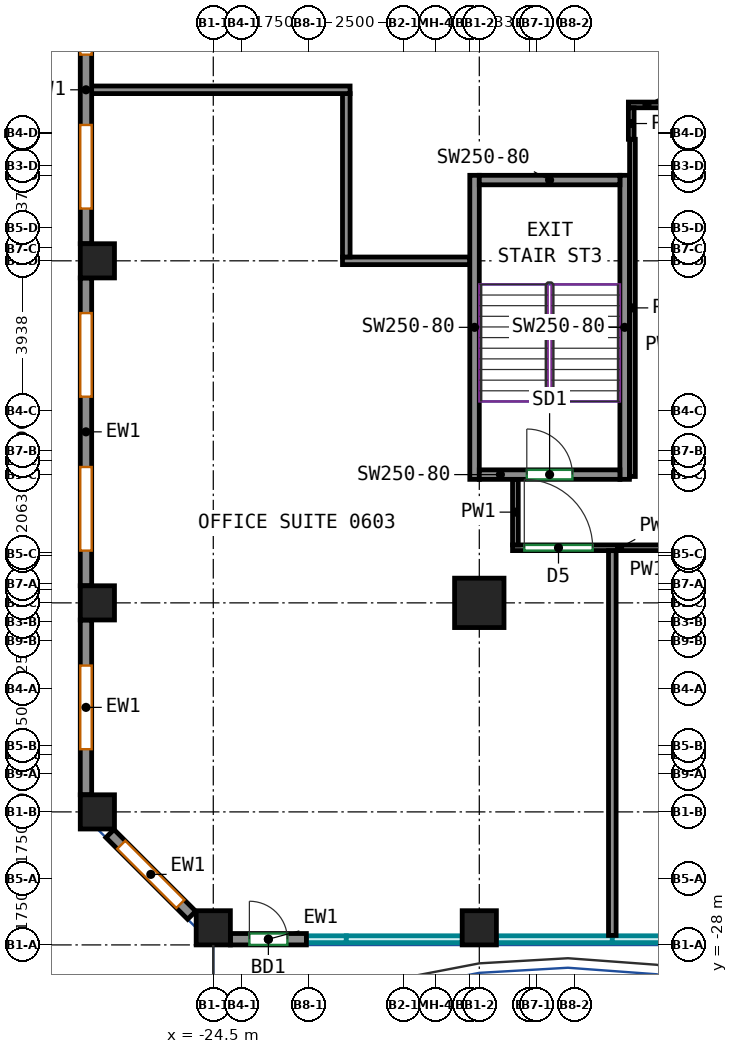
"""IFC4 building model, lengths in metres.
Left out: names, types, materials, properties, quantities, classifications, styles, units other than length and angle.
Written with IfcOpenShell. Run it as: python <this file> out.ifc"""

import sys

from ifc_helpers import new_model, si_unit, direction, frame, frame_2d, origin, origin_2d, place, context, subcontext, project, spatial, rectangle, extrude, source, transform, mapped, element, fill, save


model = new_model("IFC4")
c1 = context("Model", 3, precision=1e-05, world=origin(), true_north=direction((0.0, 1.0)))
c2 = subcontext(c1, "Body", "Model", "MODEL_VIEW")
j1 = project(units=[si_unit("LENGTHUNIT", "METRE"), si_unit("PLANEANGLEUNIT", "RADIAN")], contexts=[c1])
p1 = place(None, origin())
s1 = spatial("IfcSite", under=j1, at=p1, CompositionType="ELEMENT")
p2 = place(p1, origin())
s2 = spatial("IfcBuilding", under=s1, at=p2, CompositionType="ELEMENT")
p3 = place(p2, frame((0.0, 0.0, 31.0)))
s3 = spatial("IfcBuildingStorey", under=s2, at=p3, CompositionType="ELEMENT", Elevation=31.0)
m1 = source(origin(), c2, "Body", "SweptSolid", [
    extrude(rectangle(XDim=0.9, YDim=0.9, at=origin_2d()), origin(), (0.0, 0.0, 1.0), 3.72),
])
for number, where, z_axis, x_axis in (
    (1, (-27.55, -24.5, 0.0), (0.0, 0.0, 1.0), (1.0, 0.0, 0.0)),
    (2, (-27.55, -19.0, 0.0), (0.0, 0.0, 1.0), (1.0, 0.0, 0.0)),
    (3, (-27.55, -10.0, 0.0), (0.0, 0.0, 1.0), (1.0, 0.0, 0.0)),
    (4, (-24.5, -27.55, 0.0), (0.0, 0.0, 1.0), (1.0, 0.0, 0.0)),
    (5, (-17.5, -27.55, 0.0), (0.0, 0.0, 1.0), (1.0, 0.0, 0.0)),
):
    element("IfcColumn", number, at=place(p3, frame(where, z_axis=z_axis, x_axis=x_axis)), inside=s3, PredefinedType="COLUMN", context=c2, shape_type="MappedRepresentation", body=[
        mapped(m1, transform((0.0, 0.0, 0.0))),
    ])
m2 = source(origin(), c2, "Body", "SweptSolid", [
    extrude(rectangle(XDim=1.3, YDim=1.3, at=origin_2d()), origin(), (0.0, 0.0, 1.0), 3.72),
])
p4 = place(p3, frame((-17.5, -19.0, 0.0), z_axis=(0.0, 0.0, 1.0), x_axis=(1.0, 0.0, 0.0)))
e6 = element("IfcColumn", 6, at=p4, inside=s3, PredefinedType="COLUMN", context=c2, shape_type="MappedRepresentation", body=[
    mapped(m2, transform((0.0, 0.0, 0.0))),
])
m3 = source(origin(), c2, "Body", "SweptSolid", [
    extrude(rectangle(XDim=8.0, YDim=0.25, at=frame_2d((4.0, 0.0))), origin(), (0.0, 0.0, 1.0), 3.72),
])
for number, where, z_axis, x_axis in (
    (7, (-17.625, -15.75, 0.0), (0.0, 0.0, 1.0), (0.0, 1.0, 0.0)),
    (8, (-13.675, -15.75, 0.0), (0.0, 0.0, 1.0), (0.0, 1.0, 0.0)),
):
    element("IfcWall", number, at=place(p3, frame(where, z_axis=z_axis, x_axis=x_axis)), inside=s3, PredefinedType="SHEAR", context=c2, shape_type="MappedRepresentation", body=[
        mapped(m3, transform((0.0, 0.0, 0.0))),
    ])
m4 = source(origin(), c2, "Body", "SweptSolid", [
    extrude(rectangle(XDim=3.7, YDim=0.25, at=frame_2d((1.85, 0.0))), origin(), (0.0, 0.0, 1.0), 3.72),
])
p5 = place(p3, frame((-17.5, -15.625, 0.0), z_axis=(0.0, 0.0, 1.0), x_axis=(1.0, 0.0, 0.0)))
e9 = element("IfcWall", 9, at=p5, inside=s3, PredefinedType="SHEAR", context=c2, shape_type="MappedRepresentation", body=[
    mapped(m4, transform((0.0, 0.0, 0.0))),
])
p6 = place(p5, frame((1.25, 0.0, 0.0)))
e10 = element("IfcOpeningElement", 10, at=p6, cuts=e9, PredefinedType="OPENING", context=c2, shape_type="SweptSolid", body=[
    extrude(rectangle(XDim=1.2, YDim=2.1, at=frame_2d((0.6, 1.05))), frame((0.0, 0.135, 0.0), z_axis=(0.0, -1.0, 0.0), x_axis=(1.0, 0.0, 0.0)), (0.0, 0.0, 1.0), 0.27),
])
p7 = place(p3, frame((-17.5, -7.875, 0.0), z_axis=(0.0, 0.0, 1.0), x_axis=(1.0, 0.0, 0.0)))
e11 = element("IfcWall", 11, at=p7, inside=s3, PredefinedType="SHEAR", context=c2, shape_type="MappedRepresentation", body=[
    mapped(m4, transform((0.0, 0.0, 0.0))),
])
m5 = source(origin(), c2, "Body", "SweptSolid", [
    extrude(rectangle(XDim=2.0, YDim=0.3, at=frame_2d((1.0, 0.0))), origin(), (0.0, 0.0, 1.0), 3.72),
])
p8 = place(p3, frame((-24.05, -27.85, 0.0), z_axis=(0.0, 0.0, 1.0), x_axis=(1.0, 0.0, 0.0)))
e12 = element("IfcWall", 12, at=p8, inside=s3, PredefinedType="SOLIDWALL", context=c2, shape_type="MappedRepresentation", body=[
    mapped(m5, transform((0.0, 0.0, 0.0))),
])
p9 = place(p8, frame((0.5, 0.0, 0.0)))
e13 = element("IfcOpeningElement", 13, at=p9, cuts=e12, PredefinedType="OPENING", context=c2, shape_type="SweptSolid", body=[
    extrude(rectangle(XDim=1.0, YDim=2.1, at=frame_2d((0.5, 1.05))), frame((0.0, 0.16, 0.0), z_axis=(0.0, -1.0, 0.0), x_axis=(1.0, 0.0, 0.0)), (0.0, 0.0, 1.0), 0.32),
])
m6 = source(origin(), c2, "Body", "SweptSolid", [
    extrude(rectangle(XDim=8.1, YDim=0.3, at=frame_2d((4.05, 0.0))), origin(), (0.0, 0.0, 1.0), 3.72),
])
p10 = place(p3, frame((-27.85, -1.45, 0.0), z_axis=(0.0, 0.0, 1.0), x_axis=(0.0, -1.0, 0.0)))
e14 = element("IfcWall", 14, at=p10, inside=s3, PredefinedType="SOLIDWALL", context=c2, shape_type="MappedRepresentation", body=[
    mapped(m6, transform((0.0, 0.0, 0.0))),
])
p11 = place(p10, frame((0.925, 0.0, 0.7)))
e15 = element("IfcOpeningElement", 15, at=p11, cuts=e14, PredefinedType="OPENING", context=c2, shape_type="SweptSolid", body=[
    extrude(rectangle(XDim=2.2, YDim=2.25, at=frame_2d((1.1, 1.125))), frame((0.0, 0.16, 0.0), z_axis=(0.0, -1.0, 0.0), x_axis=(1.0, 0.0, 0.0)), (0.0, 0.0, 1.0), 0.32),
])
p12 = place(p10, frame((4.975, 0.0, 0.7)))
e16 = element("IfcOpeningElement", 16, at=p12, cuts=e14, PredefinedType="OPENING", context=c2, shape_type="SweptSolid", body=[
    extrude(rectangle(XDim=2.2, YDim=2.25, at=frame_2d((1.1, 1.125))), frame((0.0, 0.16, 0.0), z_axis=(0.0, -1.0, 0.0), x_axis=(1.0, 0.0, 0.0)), (0.0, 0.0, 1.0), 0.32),
])
p13 = place(p3, frame((-27.85, -10.45, 0.0), z_axis=(0.0, 0.0, 1.0), x_axis=(0.0, -1.0, 0.0)))
e17 = element("IfcWall", 17, at=p13, inside=s3, PredefinedType="SOLIDWALL", context=c2, shape_type="MappedRepresentation", body=[
    mapped(m6, transform((0.0, 0.0, 0.0))),
])
p14 = place(p13, frame((0.925, 0.0, 0.7)))
e18 = element("IfcOpeningElement", 18, at=p14, cuts=e17, PredefinedType="OPENING", context=c2, shape_type="SweptSolid", body=[
    extrude(rectangle(XDim=2.2, YDim=2.25, at=frame_2d((1.1, 1.125))), frame((0.0, 0.16, 0.0), z_axis=(0.0, -1.0, 0.0), x_axis=(1.0, 0.0, 0.0)), (0.0, 0.0, 1.0), 0.32),
])
p15 = place(p13, frame((4.975, 0.0, 0.7)))
e19 = element("IfcOpeningElement", 19, at=p15, cuts=e17, PredefinedType="OPENING", context=c2, shape_type="SweptSolid", body=[
    extrude(rectangle(XDim=2.2, YDim=2.25, at=frame_2d((1.1, 1.125))), frame((0.0, 0.16, 0.0), z_axis=(0.0, -1.0, 0.0), x_axis=(1.0, 0.0, 0.0)), (0.0, 0.0, 1.0), 0.32),
])
m7 = source(origin(), c2, "Body", "SweptSolid", [
    extrude(rectangle(XDim=4.6, YDim=0.3, at=frame_2d((2.3, 0.0))), origin(), (0.0, 0.0, 1.0), 3.72),
])
p16 = place(p3, frame((-27.85, -19.45, 0.0), z_axis=(0.0, 0.0, 1.0), x_axis=(0.0, -1.0, 0.0)))
e20 = element("IfcWall", 20, at=p16, inside=s3, PredefinedType="SOLIDWALL", context=c2, shape_type="MappedRepresentation", body=[
    mapped(m7, transform((0.0, 0.0, 0.0))),
])
p17 = place(p16, frame((1.2, 0.0, 0.7)))
e21 = element("IfcOpeningElement", 21, at=p17, cuts=e20, PredefinedType="OPENING", context=c2, shape_type="SweptSolid", body=[
    extrude(rectangle(XDim=2.2, YDim=2.25, at=frame_2d((1.1, 1.125))), frame((0.0, 0.16, 0.0), z_axis=(0.0, -1.0, 0.0), x_axis=(1.0, 0.0, 0.0)), (0.0, 0.0, 1.0), 0.32),
])
m8 = source(origin(), c2, "Body", "SweptSolid", [
    extrude(rectangle(XDim=3.041, YDim=0.3, at=frame_2d((1.521, 0.0))), origin(), (0.0, 0.0, 1.0), 3.72),
])
p18 = place(p3, frame((-27.219, -25.069, 0.0), z_axis=(0.0, 0.0, 1.0), x_axis=(0.707106781187, -0.707106781187, 0.0)))
e22 = element("IfcWall", 22, at=p18, inside=s3, PredefinedType="SOLIDWALL", context=c2, shape_type="MappedRepresentation", body=[
    mapped(m8, transform((0.0, 0.0, 0.0))),
])
p19 = place(p18, frame((0.42, 0.0, 0.7)))
e23 = element("IfcOpeningElement", 23, at=p19, cuts=e22, PredefinedType="OPENING", context=c2, shape_type="SweptSolid", body=[
    extrude(rectangle(XDim=2.2, YDim=2.25, at=frame_2d((1.1, 1.125))), frame((0.0, 0.16, 0.0), z_axis=(0.0, -1.0, 0.0), x_axis=(1.0, 0.0, 0.0)), (0.0, 0.0, 1.0), 0.32),
])
p20 = place(p3, frame((-12.598, -5.898, 0.0), z_axis=(0.0, 0.0, 1.0), x_axis=(-1.0, 0.0, 0.0)))
e24 = element("IfcWall", 24, at=p20, inside=s3, PredefinedType="PARTITIONING", context=c2, shape_type="SweptSolid", body=[
    extrude(rectangle(XDim=0.979, YDim=0.15, at=frame_2d((0.49, 0.0))), origin(), (0.0, 0.0, 1.0), 3.72),
])
p21 = place(p3, frame((-13.47, -6.802, 0.0), z_axis=(0.0, 0.0, 1.0), x_axis=(0.0, -1.0, 0.0)))
e25 = element("IfcWall", 25, at=p21, inside=s3, PredefinedType="PARTITIONING", context=c2, shape_type="SweptSolid", body=[
    extrude(rectangle(XDim=8.873, YDim=0.15, at=frame_2d((4.437, 0.0))), origin(), (0.0, 0.0, 1.0), 3.72),
])
p22 = place(p3, frame((-13.502, -5.973, 0.0), z_axis=(0.0, 0.0, 1.0), x_axis=(0.0, -1.0, 0.0)))
e26 = element("IfcWall", 26, at=p22, inside=s3, PredefinedType="PARTITIONING", context=c2, shape_type="SweptSolid", body=[
    extrude(rectangle(XDim=0.829, YDim=0.15, at=frame_2d((0.415, 0.0))), origin(), (0.0, 0.0, 1.0), 3.72),
])
p23 = place(p3, frame((-16.625, -17.55, 0.0), z_axis=(0.0, 0.0, 1.0), x_axis=(1.0, 0.0, 0.0)))
e27 = element("IfcWall", 27, at=p23, inside=s3, PredefinedType="PARTITIONING", context=c2, shape_type="SweptSolid", body=[
    extrude(rectangle(XDim=4.023, YDim=0.15, at=frame_2d((2.011, 0.0))), origin(), (0.0, 0.0, 1.0), 3.72),
])
p24 = place(p23, frame((0.309, 0.0, 0.0)))
e28 = element("IfcOpeningElement", 28, at=p24, cuts=e27, PredefinedType="OPENING", context=c2, shape_type="SweptSolid", body=[
    extrude(rectangle(XDim=1.8, YDim=2.1, at=frame_2d((0.9, 1.05))), frame((0.0, 0.085, 0.0), z_axis=(0.0, -1.0, 0.0), x_axis=(1.0, 0.0, 0.0)), (0.0, 0.0, 1.0), 0.17),
])
p25 = place(p3, frame((-16.55, -15.75, 0.0), z_axis=(0.0, 0.0, 1.0), x_axis=(0.0, -1.0, 0.0)))
e29 = element("IfcWall", 29, at=p25, inside=s3, PredefinedType="PARTITIONING", context=c2, shape_type="SweptSolid", body=[
    extrude(rectangle(XDim=1.725, YDim=0.15, at=frame_2d((0.863, 0.0))), origin(), (0.0, 0.0, 1.0), 3.72),
])
p26 = place(p3, frame((-21.1, -10.0, 0.0), z_axis=(0.0, 0.0, 1.0), x_axis=(1.0, 0.0, 0.0)))
e30 = element("IfcWall", 30, at=p26, inside=s3, PredefinedType="PARTITIONING", context=c2, shape_type="SweptSolid", body=[
    extrude(rectangle(XDim=3.35, YDim=0.2, at=frame_2d((1.675, 0.0))), origin(), (0.0, 0.0, 1.0), 3.72),
])
p27 = place(p3, frame((-21.0, -9.9, 0.0), z_axis=(0.0, 0.0, 1.0), x_axis=(0.0, 1.0, 0.0)))
e31 = element("IfcWall", 31, at=p27, inside=s3, PredefinedType="PARTITIONING", context=c2, shape_type="SweptSolid", body=[
    extrude(rectangle(XDim=4.3, YDim=0.2, at=frame_2d((2.15, 0.0))), origin(), (0.0, 0.0, 1.0), 3.72),
])
p28 = place(p3, frame((-27.75, -5.5, 0.0), z_axis=(0.0, 0.0, 1.0), x_axis=(1.0, 0.0, 0.0)))
e32 = element("IfcWall", 32, at=p28, inside=s3, PredefinedType="PARTITIONING", context=c2, shape_type="SweptSolid", body=[
    extrude(rectangle(XDim=6.85, YDim=0.2, at=frame_2d((3.425, 0.0))), origin(), (0.0, 0.0, 1.0), 3.72),
])
p29 = place(p3, frame((-14.0, -27.75, 0.0), z_axis=(0.0, 0.0, 1.0), x_axis=(0.0, 1.0, 0.0)))
e33 = element("IfcWall", 33, at=p29, inside=s3, PredefinedType="PARTITIONING", context=c2, shape_type="SweptSolid", body=[
    extrude(rectangle(XDim=10.124, YDim=0.2, at=frame_2d((5.062, 0.0))), origin(), (0.0, 0.0, 1.0), 3.72),
])
p30 = place(p9, origin())
e34 = element("IfcDoor", 34, at=p30, inside=s3, OperationType="SINGLE_SWING_LEFT", PredefinedType="DOOR", context=c2, shape_type="SweptSolid", body=[
    extrude(rectangle(XDim=1.0, YDim=2.1, at=frame_2d((0.5, 1.05))), frame((0.0, 0.025, 0.0), z_axis=(0.0, -1.0, 0.0), x_axis=(1.0, 0.0, 0.0)), (0.0, 0.0, 1.0), 0.05),
])
fill(e13, e34)
p31 = place(p11, origin())
e35 = element("IfcWindow", 35, at=p31, inside=s3, PartitioningType="SINGLE_PANEL", PredefinedType="WINDOW", context=c2, shape_type="SweptSolid", body=[
    extrude(rectangle(XDim=2.2, YDim=2.25, at=frame_2d((1.1, 1.125))), frame((0.0, 0.03, 0.0), z_axis=(0.0, -1.0, 0.0), x_axis=(1.0, 0.0, 0.0)), (0.0, 0.0, 1.0), 0.06),
])
fill(e15, e35)
p32 = place(p12, origin())
e36 = element("IfcWindow", 36, at=p32, inside=s3, PartitioningType="SINGLE_PANEL", PredefinedType="WINDOW", context=c2, shape_type="SweptSolid", body=[
    extrude(rectangle(XDim=2.2, YDim=2.25, at=frame_2d((1.1, 1.125))), frame((0.0, 0.03, 0.0), z_axis=(0.0, -1.0, 0.0), x_axis=(1.0, 0.0, 0.0)), (0.0, 0.0, 1.0), 0.06),
])
fill(e16, e36)
p33 = place(p14, origin())
e37 = element("IfcWindow", 37, at=p33, inside=s3, PartitioningType="SINGLE_PANEL", PredefinedType="WINDOW", context=c2, shape_type="SweptSolid", body=[
    extrude(rectangle(XDim=2.2, YDim=2.25, at=frame_2d((1.1, 1.125))), frame((0.0, 0.03, 0.0), z_axis=(0.0, -1.0, 0.0), x_axis=(1.0, 0.0, 0.0)), (0.0, 0.0, 1.0), 0.06),
])
fill(e18, e37)
p34 = place(p15, origin())
e38 = element("IfcWindow", 38, at=p34, inside=s3, PartitioningType="SINGLE_PANEL", PredefinedType="WINDOW", context=c2, shape_type="SweptSolid", body=[
    extrude(rectangle(XDim=2.2, YDim=2.25, at=frame_2d((1.1, 1.125))), frame((0.0, 0.03, 0.0), z_axis=(0.0, -1.0, 0.0), x_axis=(1.0, 0.0, 0.0)), (0.0, 0.0, 1.0), 0.06),
])
fill(e19, e38)
p35 = place(p17, origin())
e39 = element("IfcWindow", 39, at=p35, inside=s3, PartitioningType="SINGLE_PANEL", PredefinedType="WINDOW", context=c2, shape_type="SweptSolid", body=[
    extrude(rectangle(XDim=2.2, YDim=2.25, at=frame_2d((1.1, 1.125))), frame((0.0, 0.03, 0.0), z_axis=(0.0, -1.0, 0.0), x_axis=(1.0, 0.0, 0.0)), (0.0, 0.0, 1.0), 0.06),
])
fill(e21, e39)
p36 = place(p19, origin())
e40 = element("IfcWindow", 40, at=p36, inside=s3, PartitioningType="SINGLE_PANEL", PredefinedType="WINDOW", context=c2, shape_type="SweptSolid", body=[
    extrude(rectangle(XDim=2.2, YDim=2.25, at=frame_2d((1.1, 1.125))), frame((0.0, 0.03, 0.0), z_axis=(0.0, -1.0, 0.0), x_axis=(1.0, 0.0, 0.0)), (0.0, 0.0, 1.0), 0.06),
])
fill(e23, e40)
p37 = place(p6, origin())
e41 = element("IfcDoor", 41, at=p37, inside=s3, OperationType="DOUBLE_DOOR_SINGLE_SWING", PredefinedType="DOOR", context=c2, shape_type="SweptSolid", body=[
    extrude(rectangle(XDim=1.2, YDim=2.1, at=frame_2d((0.6, 1.05))), frame((0.0, 0.025, 0.0), z_axis=(0.0, -1.0, 0.0), x_axis=(1.0, 0.0, 0.0)), (0.0, 0.0, 1.0), 0.05),
])
fill(e10, e41)
p38 = place(p24, origin())
e42 = element("IfcDoor", 42, at=p38, inside=s3, OperationType="DOUBLE_DOOR_SINGLE_SWING", PredefinedType="DOOR", context=c2, shape_type="SweptSolid", body=[
    extrude(rectangle(XDim=1.8, YDim=2.1, at=frame_2d((0.9, 1.05))), frame((0.0, 0.025, 0.0), z_axis=(0.0, -1.0, 0.0), x_axis=(1.0, 0.0, 0.0)), (0.0, 0.0, 1.0), 0.05),
])
fill(e28, e42)
save(model, sys.argv[1])
